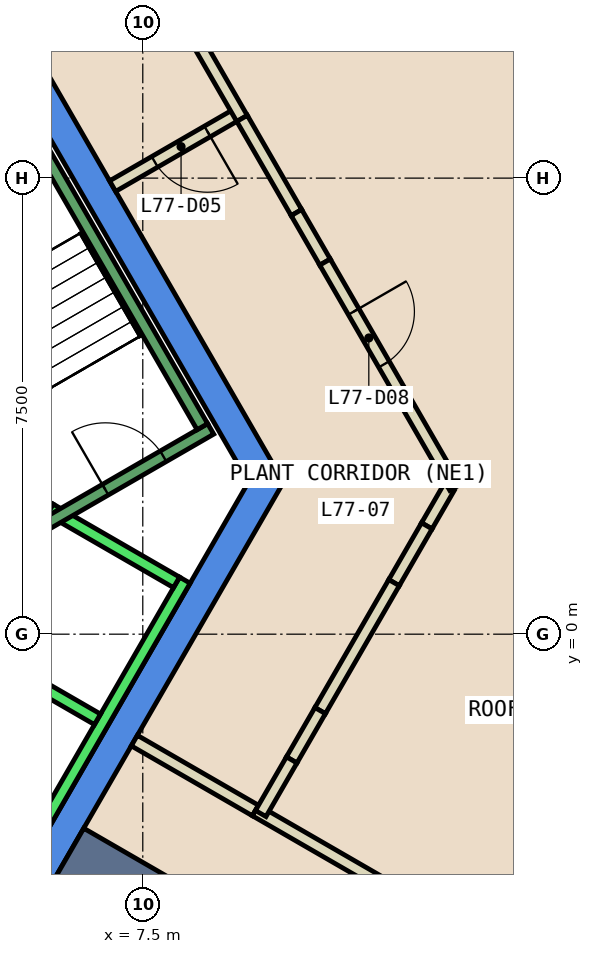
"""IFC4 building model, lengths in metres.
Left out: names, types, materials, properties, quantities, classifications, styles, units other than length and angle.
Written with IfcOpenShell. Run it as: python <this file> out.ifc"""

import sys

from ifc_helpers import new_model, si_unit, direction, frame, frame_2d, origin, place, context, subcontext, project, spatial, polyline, rectangle, outline, extrude, element, fill, save


model = new_model("IFC4")
c1 = context("Model", 3, precision=1e-05, world=origin(), true_north=direction((0.0, 1.0)))
c2 = subcontext(c1, "Body", "Model", "MODEL_VIEW")
j1 = project(units=[si_unit("LENGTHUNIT", "METRE"), si_unit("PLANEANGLEUNIT", "RADIAN")], contexts=[c1])
p1 = place(None, origin())
s1 = spatial("IfcSite", under=j1, at=p1, CompositionType="ELEMENT")
p2 = place(p1, origin())
s2 = spatial("IfcBuilding", under=s1, at=p2, CompositionType="ELEMENT")
p3 = place(p2, frame((0.0, 0.0, 326.0)))
s3 = spatial("IfcBuildingStorey", under=s2, at=p3, CompositionType="ELEMENT", Elevation=326.0)
p4 = place(p3, frame((0.0, 0.0, -0.6)))
e1 = element("IfcWall", 1, at=p4, inside=s3, PredefinedType="SHEAR", context=c2, shape_type="SweptSolid", body=[
    extrude(outline(polyline([(5.486, 9.998), (5.053, 9.748), (9.238, 2.5), (9.815, 2.5), (5.486, 9.998)])), origin(), (0.0, 0.0, 1.0), 5.55),
])
p5 = place(p3, frame((0.0, 0.0, -0.6)))
e2 = element("IfcWall", 2, at=p5, inside=s3, PredefinedType="SHEAR", context=c2, shape_type="SweptSolid", body=[
    extrude(outline(polyline([(4.907, -6.0), (9.815, 2.5), (9.238, 2.5), (4.619, -5.5), (4.907, -6.0)])), origin(), (0.0, 0.0, 1.0), 5.55),
])
p6 = place(p3, frame((6.279, -3.625, 0.0), z_axis=(0.0, 0.0, 1.0), x_axis=(0.866025543801, -0.499999757484, 0.0)))
e3 = element("IfcWall", 3, at=p6, inside=s3, PredefinedType="SHEAR", context=c2, shape_type="SweptSolid", body=[
    extrude(rectangle(XDim=17.452, YDim=1.0, at=frame_2d((8.726, 0.0))), origin(), (0.0, 0.0, 1.0), 4.95),
])
p7 = place(p3, frame((7.361, -1.75, 0.0), z_axis=(0.0, 0.0, 1.0), x_axis=(0.866053019151, -0.499952165731, 0.0)))
e4 = element("IfcWall", 4, at=p7, inside=s3, PredefinedType="PARTITIONING", context=c2, shape_type="SweptSolid", body=[
    extrude(rectangle(XDim=2.3, YDim=0.2, at=frame_2d((1.15, 0.0))), origin(), (0.0, 0.0, 1.0), 4.95),
])
p8 = place(p3, frame((9.353, -2.9, 0.0), z_axis=(0.0, 0.0, 1.0), x_axis=(0.866014146277, -0.500019498068, 0.0)))
e5 = element("IfcWall", 5, at=p8, inside=s3, PredefinedType="PARTITIONING", context=c2, shape_type="SweptSolid", body=[
    extrude(rectangle(XDim=15.178, YDim=0.2, at=frame_2d((7.589, 0.0))), origin(), (0.0, 0.0, 1.0), 4.95),
])
p9 = place(p3, frame((9.082, 8.568, 0.0), z_axis=(0.0, 0.0, 1.0), x_axis=(-0.865955154139, -0.50012165622, 0.0)))
e6 = element("IfcWall", 6, at=p9, inside=s3, PredefinedType="PARTITIONING", context=c2, shape_type="SweptSolid", body=[
    extrude(rectangle(XDim=2.4, YDim=0.2, at=frame_2d((1.2, 0.0))), origin(), (0.0, 0.0, 1.0), 4.95),
])
p10 = place(p9, frame((0.6, 0.0, 0.0)))
e7 = element("IfcOpeningElement", 7, at=p10, cuts=e6, PredefinedType="OPENING", context=c2, shape_type="SweptSolid", body=[
    extrude(rectangle(XDim=1.0, YDim=2.1, at=frame_2d((0.5, 1.05))), frame((0.0, 0.11, 0.0), z_axis=(0.0, -1.0, 0.0), x_axis=(1.0, 0.0, 0.0)), (0.0, 0.0, 1.0), 0.22),
])
p11 = place(p3, frame((5.532, 14.717, 0.0), z_axis=(0.0, 0.0, 1.0), x_axis=(0.499968011863, -0.866043871356, 0.0)))
e8 = element("IfcWall", 8, at=p11, inside=s3, PredefinedType="PARTITIONING", context=c2, shape_type="SweptSolid", body=[
    extrude(rectangle(XDim=7.201, YDim=0.2, at=frame_2d((3.6, 0.0))), origin(), (0.0, 0.0, 1.0), 4.95),
])
p12 = place(p11, frame((2.143, 0.0, 0.0)))
e9 = element("IfcOpeningElement", 9, at=p12, cuts=e8, PredefinedType="OPENING", context=c2, shape_type="SweptSolid", body=[
    extrude(rectangle(XDim=1.0, YDim=2.1, at=frame_2d((0.5, 1.05))), frame((0.0, 0.11, 0.0), z_axis=(0.0, -1.0, 0.0), x_axis=(1.0, 0.0, 0.0)), (0.0, 0.0, 1.0), 0.22),
])
p13 = place(p3, frame((9.133, 8.482, 0.0), z_axis=(0.0, 0.0, 1.0), x_axis=(0.499927291608, -0.866067377925, 0.0)))
e10 = element("IfcWall", 10, at=p13, inside=s3, PredefinedType="PARTITIONING", context=c2, shape_type="SweptSolid", body=[
    extrude(rectangle(XDim=1.788, YDim=0.2, at=frame_2d((0.894, 0.0))), origin(), (0.0, 0.0, 1.0), 4.95),
])
p14 = place(p3, frame((12.536, 2.413, 0.0), z_axis=(0.0, 0.0, 1.0), x_axis=(-0.500060245112, -0.865990618459, 0.0)))
e11 = element("IfcWall", 11, at=p14, inside=s3, PredefinedType="PARTITIONING", context=c2, shape_type="SweptSolid", body=[
    extrude(rectangle(XDim=0.73, YDim=0.2, at=frame_2d((0.365, 0.0))), origin(), (0.0, 0.0, 1.0), 4.95),
])
p15 = place(p3, frame((10.027, 6.933, 0.0), z_axis=(0.0, 0.0, 1.0), x_axis=(0.499909789979, -0.8660774803, 0.0)))
e12 = element("IfcWall", 12, at=p15, inside=s3, PredefinedType="PARTITIONING", context=c2, shape_type="SweptSolid", body=[
    extrude(rectangle(XDim=0.94, YDim=0.2, at=frame_2d((0.47, 0.0))), origin(), (0.0, 0.0, 1.0), 2.55),
])
p16 = place(p3, frame((10.497, 6.119, 0.0), z_axis=(0.0, 0.0, 1.0), x_axis=(0.499888743268, -0.866089628361, 0.0)))
e13 = element("IfcWall", 13, at=p16, inside=s3, PredefinedType="PARTITIONING", context=c2, shape_type="SweptSolid", body=[
    extrude(rectangle(XDim=4.279, YDim=0.2, at=frame_2d((2.139, 0.0))), origin(), (0.0, 0.0, 1.0), 4.95),
])
p17 = place(p16, frame((0.941, 0.0, 0.0)))
e14 = element("IfcOpeningElement", 14, at=p17, cuts=e13, PredefinedType="OPENING", context=c2, shape_type="SweptSolid", body=[
    extrude(rectangle(XDim=1.0, YDim=2.1, at=frame_2d((0.5, 1.05))), frame((0.0, 0.11, 0.0), z_axis=(0.0, -1.0, 0.0), x_axis=(1.0, 0.0, 0.0)), (0.0, 0.0, 1.0), 0.22),
])
p18 = place(p3, frame((12.171, 1.781, 0.0), z_axis=(0.0, 0.0, 1.0), x_axis=(-0.499670186534, -0.86621573796, 0.0)))
e15 = element("IfcWall", 15, at=p18, inside=s3, PredefinedType="PARTITIONING", context=c2, shape_type="SweptSolid", body=[
    extrude(rectangle(XDim=1.078, YDim=0.2, at=frame_2d((0.539, 0.0))), origin(), (0.0, 0.0, 1.0), 2.55),
])
p19 = place(p3, frame((11.632, 0.847, 0.0), z_axis=(0.0, 0.0, 1.0), x_axis=(-0.500105155565, -0.865964683678, 0.0)))
e16 = element("IfcWall", 16, at=p19, inside=s3, PredefinedType="PARTITIONING", context=c2, shape_type="SweptSolid", body=[
    extrude(rectangle(XDim=2.43, YDim=0.2, at=frame_2d((1.215, 0.0))), origin(), (0.0, 0.0, 1.0), 4.95),
])
p20 = place(p3, frame((10.417, -1.257, 0.0), z_axis=(0.0, 0.0, 1.0), x_axis=(-0.499812735651, -0.866133493915, 0.0)))
e17 = element("IfcWall", 17, at=p20, inside=s3, PredefinedType="PARTITIONING", context=c2, shape_type="SweptSolid", body=[
    extrude(rectangle(XDim=0.936, YDim=0.2, at=frame_2d((0.468, 0.0))), origin(), (0.0, 0.0, 1.0), 2.55),
])
p21 = place(p3, frame((9.949, -2.068, 0.0), z_axis=(0.0, 0.0, 1.0), x_axis=(-0.499930013145, -0.866065806944, 0.0)))
e18 = element("IfcWall", 18, at=p21, inside=s3, PredefinedType="PARTITIONING", context=c2, shape_type="SweptSolid", body=[
    extrude(rectangle(XDim=1.018, YDim=0.2, at=frame_2d((0.509, 0.0))), origin(), (0.0, 0.0, 1.0), 4.95),
])
p22 = place(p3, frame((3.24, -2.488, 0.0), z_axis=(0.0, 0.0, 1.0), x_axis=(0.500034260056, 0.866005622828, 0.0)))
e19 = element("IfcWall", 19, at=p22, inside=s3, PredefinedType="STANDARD", context=c2, shape_type="SweptSolid", body=[
    extrude(rectangle(XDim=5.399, YDim=0.2, at=frame_2d((2.7, 0.0))), origin(), (0.0, 0.0, 1.0), 4.95),
])
p23 = place(p22, frame((3.225, 0.0, 0.0)))
e20 = element("IfcOpeningElement", 20, at=p23, cuts=e19, PredefinedType="OPENING", context=c2, shape_type="SweptSolid", body=[
    extrude(rectangle(XDim=1.1, YDim=2.1, at=frame_2d((0.55, 1.05))), frame((0.0, 0.11, 0.0), z_axis=(0.0, -1.0, 0.0), x_axis=(1.0, 0.0, 0.0)), (0.0, 0.0, 1.0), 0.22),
])
p24 = place(p22, frame((1.225, 0.0, 0.0)))
e21 = element("IfcOpeningElement", 21, at=p24, cuts=e19, PredefinedType="OPENING", context=c2, shape_type="SweptSolid", body=[
    extrude(rectangle(XDim=1.1, YDim=2.1, at=frame_2d((0.55, 1.05))), frame((0.0, 0.11, 0.0), z_axis=(0.0, -1.0, 0.0), x_axis=(1.0, 0.0, 0.0)), (0.0, 0.0, 1.0), 0.22),
])
p25 = place(p3, frame((5.492, -3.788, 0.0), z_axis=(0.0, 0.0, 1.0), x_axis=(0.500034260056, 0.866005622828, 0.0)))
e22 = element("IfcWall", 22, at=p25, inside=s3, PredefinedType="STANDARD", context=c2, shape_type="SweptSolid", body=[
    extrude(rectangle(XDim=5.399, YDim=0.2, at=frame_2d((2.7, 0.0))), origin(), (0.0, 0.0, 1.0), 4.95),
])
for number, where, z_axis, x_axis in (
    (23, (4.677, -0.2, 0.0), (0.0, 0.0, 1.0), (0.866, -0.5, 0.0)),
    (24, (5.977, 2.052, 0.0), (0.0, 0.0, 1.0), (0.866, -0.5, 0.0)),
):
    element("IfcWall", number, at=place(p3, frame(where, z_axis=z_axis, x_axis=x_axis)), inside=s3, PredefinedType="STANDARD", context=c2, shape_type="SweptSolid", body=[
        extrude(rectangle(XDim=2.399, YDim=0.2, at=frame_2d((1.2, 0.0))), origin(), (0.0, 0.0, 1.0), 4.95),
    ])
p26 = place(p3, frame((4.806, 1.176, 0.0), z_axis=(0.0, 0.0, 1.0), x_axis=(0.866059941101, 0.499940174841, 0.0)))
e25 = element("IfcWall", 25, at=p26, inside=s3, PredefinedType="STANDARD", context=c2, shape_type="SweptSolid", body=[
    extrude(rectangle(XDim=4.4, YDim=0.2, at=frame_2d((2.2, 0.0))), origin(), (0.0, 0.0, 1.0), 4.95),
])
p27 = place(p26, frame((2.4, 0.0, 0.0)))
e26 = element("IfcOpeningElement", 26, at=p27, cuts=e25, PredefinedType="OPENING", context=c2, shape_type="SweptSolid", body=[
    extrude(rectangle(XDim=1.1, YDim=2.2, at=frame_2d((0.55, 1.1))), frame((0.0, 0.11, 0.0), z_axis=(0.0, -1.0, 0.0), x_axis=(1.0, 0.0, 0.0)), (0.0, 0.0, 1.0), 0.22),
])
p28 = place(p3, frame((8.48, 3.412, 0.0), z_axis=(0.0, 0.0, 1.0), x_axis=(-0.499978703459, 0.866037698999, 0.0)))
e27 = element("IfcWall", 27, at=p28, inside=s3, PredefinedType="STANDARD", context=c2, shape_type="SweptSolid", body=[
    extrude(rectangle(XDim=6.9, YDim=0.2, at=frame_2d((3.45, 0.0))), origin(), (0.0, 0.0, 1.0), 4.95),
])
p29 = place(p10, origin())
e28 = element("IfcDoor", 28, at=p29, inside=s3, OperationType="SINGLE_SWING_LEFT", PredefinedType="DOOR", context=c2, shape_type="SweptSolid", body=[
    extrude(rectangle(XDim=1.0, YDim=2.1, at=frame_2d((0.5, 1.05))), frame((0.0, 0.025, 0.0), z_axis=(0.0, -1.0, 0.0), x_axis=(1.0, 0.0, 0.0)), (0.0, 0.0, 1.0), 0.05),
])
fill(e7, e28)
p30 = place(p17, origin())
e29 = element("IfcDoor", 29, at=p30, inside=s3, OperationType="SINGLE_SWING_RIGHT", PredefinedType="DOOR", context=c2, shape_type="SweptSolid", body=[
    extrude(rectangle(XDim=1.0, YDim=2.1, at=frame_2d((0.5, 1.05))), frame((0.0, 0.025, 0.0), z_axis=(0.0, -1.0, 0.0), x_axis=(1.0, 0.0, 0.0)), (0.0, 0.0, 1.0), 0.05),
])
fill(e14, e29)
p31 = place(p27, origin())
e30 = element("IfcDoor", 30, at=p31, inside=s3, OperationType="SINGLE_SWING_LEFT", PredefinedType="DOOR", context=c2, shape_type="SweptSolid", body=[
    extrude(rectangle(XDim=1.1, YDim=2.2, at=frame_2d((0.55, 1.1))), frame((0.0, 0.025, 0.0), z_axis=(0.0, -1.0, 0.0), x_axis=(1.0, 0.0, 0.0)), (0.0, 0.0, 1.0), 0.05),
])
fill(e26, e30)
save(model, sys.argv[1])
